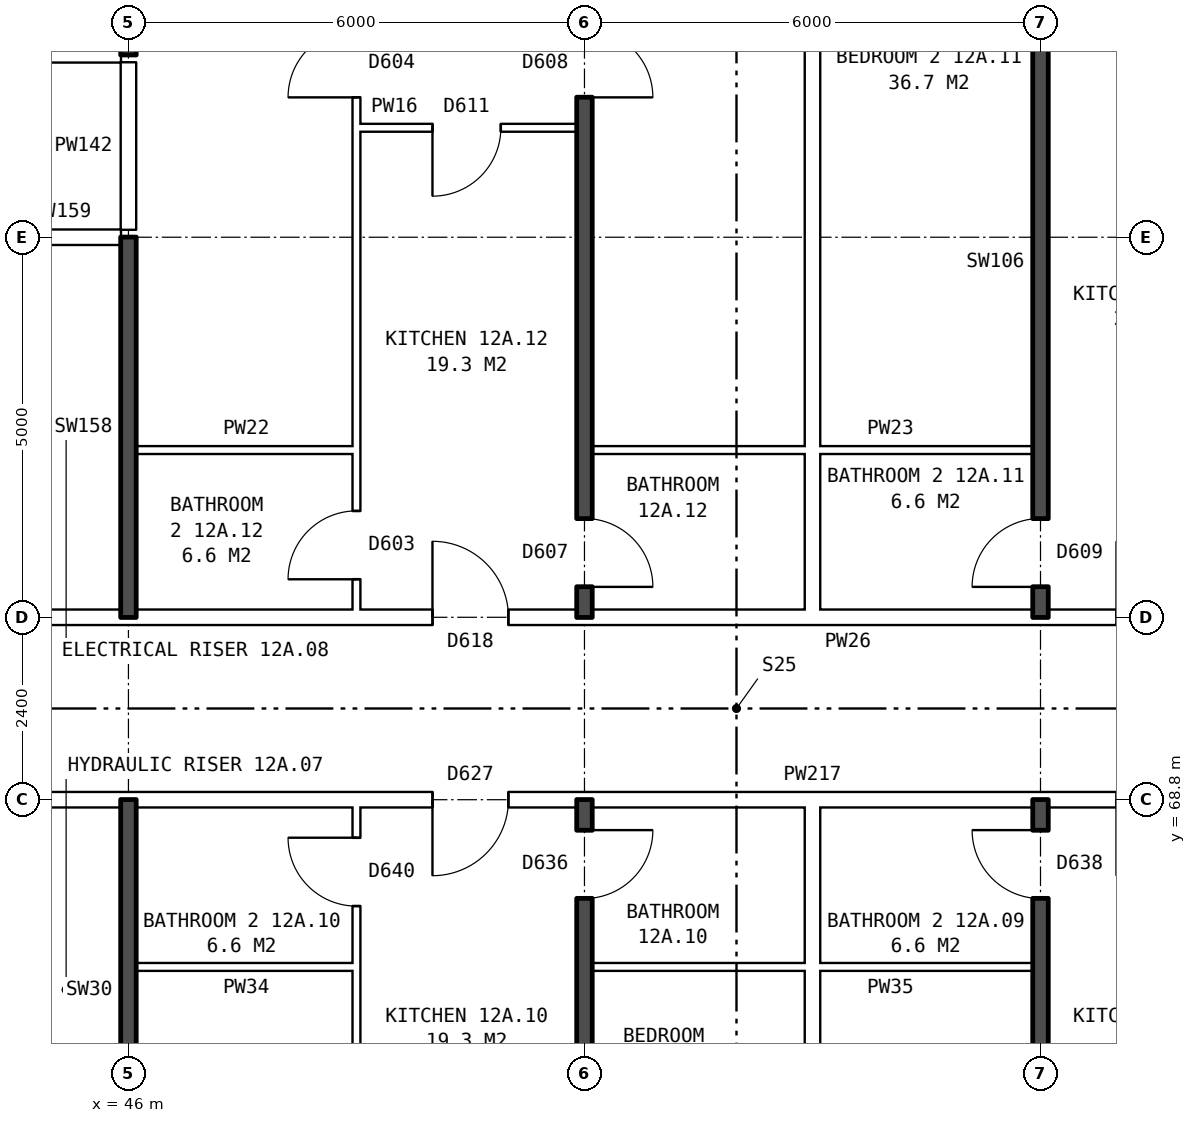
"""IFC4 building model, lengths in metres.
Left out: names, types, materials, properties, quantities, classifications, styles, units other than length and angle.
Written with IfcOpenShell. Run it as: python <this file> out.ifc"""

import sys

from ifc_helpers import new_model, si_unit, direction, frame, frame_2d, origin, place, context, subcontext, project, spatial, rectangle, extrude, element, fill, save


model = new_model("IFC4")
c1 = context("Model", 3, precision=1e-05, world=origin(), true_north=direction((0.0, 1.0)))
c2 = subcontext(c1, "Body", "Model", "MODEL_VIEW")
j1 = project(units=[si_unit("LENGTHUNIT", "METRE"), si_unit("PLANEANGLEUNIT", "RADIAN")], contexts=[c1])
p1 = place(None, origin())
s1 = spatial("IfcSite", under=j1, at=p1, CompositionType="ELEMENT")
p2 = place(p1, origin())
s2 = spatial("IfcBuilding", under=s1, at=p2, CompositionType="ELEMENT")
p3 = place(p2, frame((0.0, 0.0, 47.4)))
s3 = spatial("IfcBuildingStorey", under=s2, at=p3, CompositionType="ELEMENT", Elevation=47.4)
p4 = place(p3, frame((46.1, 66.6, 0.0), z_axis=(0.0, 0.0, 1.0), x_axis=(1.0, 0.0, 0.0)))
e1 = element("IfcWall", 1, at=p4, inside=s3, PredefinedType="PARTITIONING", context=c2, shape_type="SweptSolid", body=[
    extrude(rectangle(XDim=2.9, YDim=0.1, at=frame_2d((1.45, 0.0))), origin(), (0.0, 0.0, 1.0), 2.85),
])
p5 = place(p3, frame((52.1, 66.6, 0.0), z_axis=(0.0, 0.0, 1.0), x_axis=(1.0, 0.0, 0.0)))
e2 = element("IfcWall", 2, at=p5, inside=s3, PredefinedType="PARTITIONING", context=c2, shape_type="SweptSolid", body=[
    extrude(rectangle(XDim=5.8, YDim=0.1, at=frame_2d((2.9, 0.0))), origin(), (0.0, 0.0, 1.0), 2.85),
])
p6 = place(p3, frame((44.36, 68.8, 0.0), z_axis=(0.0, 0.0, 1.0), x_axis=(1.0, 0.0, 0.0)))
e3 = element("IfcWall", 3, at=p6, inside=s3, PredefinedType="PARTITIONING", context=c2, shape_type="SweptSolid", body=[
    extrude(rectangle(XDim=19.28, YDim=0.2, at=frame_2d((9.64, 0.0))), origin(), (0.0, 0.0, 1.0), 2.85),
])
p7 = place(p6, frame((14.64, 0.0, 0.0)))
e4 = element("IfcOpeningElement", 4, at=p7, cuts=e3, PredefinedType="OPENING", context=c2, shape_type="SweptSolid", body=[
    extrude(rectangle(XDim=1.0, YDim=2.1, at=frame_2d((0.5, 1.05))), frame((0.0, 0.11, 0.0), z_axis=(0.0, -1.0, 0.0), x_axis=(1.0, 0.0, 0.0)), (0.0, 0.0, 1.0), 0.22),
])
p8 = place(p6, frame((5.64, 0.0, 0.0)))
e5 = element("IfcOpeningElement", 5, at=p8, cuts=e3, PredefinedType="OPENING", context=c2, shape_type="SweptSolid", body=[
    extrude(rectangle(XDim=1.0, YDim=2.1, at=frame_2d((0.5, 1.05))), frame((0.0, 0.11, 0.0), z_axis=(0.0, -1.0, 0.0), x_axis=(1.0, 0.0, 0.0)), (0.0, 0.0, 1.0), 0.22),
])
p9 = place(p3, frame((44.36, 71.2, 0.0), z_axis=(0.0, 0.0, 1.0), x_axis=(1.0, 0.0, 0.0)))
e6 = element("IfcWall", 6, at=p9, inside=s3, PredefinedType="PARTITIONING", context=c2, shape_type="SweptSolid", body=[
    extrude(rectangle(XDim=19.28, YDim=0.2, at=frame_2d((9.64, 0.0))), origin(), (0.0, 0.0, 1.0), 2.85),
])
p10 = place(p9, frame((14.64, 0.0, 0.0)))
e7 = element("IfcOpeningElement", 7, at=p10, cuts=e6, PredefinedType="OPENING", context=c2, shape_type="SweptSolid", body=[
    extrude(rectangle(XDim=1.0, YDim=2.1, at=frame_2d((0.5, 1.05))), frame((0.0, 0.11, 0.0), z_axis=(0.0, -1.0, 0.0), x_axis=(1.0, 0.0, 0.0)), (0.0, 0.0, 1.0), 0.22),
])
p11 = place(p9, frame((5.64, 0.0, 0.0)))
e8 = element("IfcOpeningElement", 8, at=p11, cuts=e6, PredefinedType="OPENING", context=c2, shape_type="SweptSolid", body=[
    extrude(rectangle(XDim=1.0, YDim=2.1, at=frame_2d((0.5, 1.05))), frame((0.0, 0.11, 0.0), z_axis=(0.0, -1.0, 0.0), x_axis=(1.0, 0.0, 0.0)), (0.0, 0.0, 1.0), 0.22),
])
p12 = place(p3, frame((46.1, 73.4, 0.0), z_axis=(0.0, 0.0, 1.0), x_axis=(1.0, 0.0, 0.0)))
e9 = element("IfcWall", 9, at=p12, inside=s3, PredefinedType="PARTITIONING", context=c2, shape_type="SweptSolid", body=[
    extrude(rectangle(XDim=2.9, YDim=0.1, at=frame_2d((1.45, 0.0))), origin(), (0.0, 0.0, 1.0), 2.85),
])
p13 = place(p3, frame((52.1, 73.4, 0.0), z_axis=(0.0, 0.0, 1.0), x_axis=(1.0, 0.0, 0.0)))
e10 = element("IfcWall", 10, at=p13, inside=s3, PredefinedType="PARTITIONING", context=c2, shape_type="SweptSolid", body=[
    extrude(rectangle(XDim=5.8, YDim=0.1, at=frame_2d((2.9, 0.0))), origin(), (0.0, 0.0, 1.0), 2.85),
])
p14 = place(p3, frame((44.36, 76.2, 0.0), z_axis=(0.0, 0.0, 1.0), x_axis=(1.0, 0.0, 0.0)))
e11 = element("IfcWall", 11, at=p14, inside=s3, PredefinedType="PARTITIONING", context=c2, shape_type="SweptSolid", body=[
    extrude(rectangle(XDim=1.54, YDim=0.2, at=frame_2d((0.77, 0.0))), origin(), (0.0, 0.0, 1.0), 2.85),
])
p15 = place(p3, frame((49.0, 77.64, 0.0), z_axis=(0.0, 0.0, 1.0), x_axis=(1.0, 0.0, 0.0)))
e12 = element("IfcWall", 12, at=p15, inside=s3, PredefinedType="PARTITIONING", context=c2, shape_type="SweptSolid", body=[
    extrude(rectangle(XDim=2.9, YDim=0.1, at=frame_2d((1.45, 0.0))), origin(), (0.0, 0.0, 1.0), 2.85),
])
p16 = place(p15, frame((1.0, 0.0, 0.0)))
e13 = element("IfcOpeningElement", 13, at=p16, cuts=e12, PredefinedType="OPENING", context=c2, shape_type="SweptSolid", body=[
    extrude(rectangle(XDim=0.9, YDim=2.1, at=frame_2d((0.45, 1.05))), frame((0.0, 0.06, 0.0), z_axis=(0.0, -1.0, 0.0), x_axis=(1.0, 0.0, 0.0)), (0.0, 0.0, 1.0), 0.12),
])
p17 = place(p3, frame((21.86, 78.6, 0.0), z_axis=(0.0, 0.0, 1.0), x_axis=(1.0, 0.0, 0.0)))
e14 = element("IfcWall", 14, at=p17, inside=s3, PredefinedType="PARTITIONING", context=c2, shape_type="SweptSolid", body=[
    extrude(rectangle(XDim=24.04, YDim=0.2, at=frame_2d((12.02, 0.0))), origin(), (0.0, 0.0, 1.0), 2.85),
])
p18 = place(p17, frame((20.59, 0.0, 0.0)))
e15 = element("IfcOpeningElement", 15, at=p18, cuts=e14, PredefinedType="OPENING", context=c2, shape_type="SweptSolid", body=[
    extrude(rectangle(XDim=1.0, YDim=2.1, at=frame_2d((0.5, 1.05))), frame((0.0, 0.11, 0.0), z_axis=(0.0, -1.0, 0.0), x_axis=(1.0, 0.0, 0.0)), (0.0, 0.0, 1.0), 0.22),
])
p19 = place(p17, frame((8.64, 0.0, 0.0)))
e16 = element("IfcOpeningElement", 16, at=p19, cuts=e14, PredefinedType="OPENING", context=c2, shape_type="SweptSolid", body=[
    extrude(rectangle(XDim=1.0, YDim=2.1, at=frame_2d((0.5, 1.05))), frame((0.0, 0.11, 0.0), z_axis=(0.0, -1.0, 0.0), x_axis=(1.0, 0.0, 0.0)), (0.0, 0.0, 1.0), 0.22),
])
p20 = place(p17, frame((1.37, 0.0, 0.0)))
e17 = element("IfcOpeningElement", 17, at=p20, cuts=e14, PredefinedType="OPENING", context=c2, shape_type="SweptSolid", body=[
    extrude(rectangle(XDim=1.0, YDim=2.1, at=frame_2d((0.5, 1.05))), frame((0.0, 0.11, 0.0), z_axis=(0.0, -1.0, 0.0), x_axis=(1.0, 0.0, 0.0)), (0.0, 0.0, 1.0), 0.22),
])
for number, where, z_axis, x_axis in (
    (18, (46.0, 63.8, 0.0), (0.0, 0.0, 1.0), (0.0, 1.0, 0.0)),
    (19, (46.0, 71.2, 0.0), (0.0, 0.0, 1.0), (0.0, 1.0, 0.0)),
):
    element("IfcWall", number, at=place(p3, frame(where, z_axis=z_axis, x_axis=x_axis)), inside=s3, PredefinedType="SOLIDWALL", context=c2, shape_type="SweptSolid", body=[
        extrude(rectangle(XDim=5.0, YDim=0.2, at=frame_2d((2.5, 0.0))), origin(), (0.0, 0.0, 1.0), 2.85),
    ])
p21 = place(p3, frame((46.0, 76.3, 0.0), z_axis=(0.0, 0.0, 1.0), x_axis=(0.0, 1.0, 0.0)))
e20 = element("IfcWall", 20, at=p21, inside=s3, PredefinedType="PARTITIONING", context=c2, shape_type="SweptSolid", body=[
    extrude(rectangle(XDim=2.2, YDim=0.2, at=frame_2d((1.1, 0.0))), origin(), (0.0, 0.0, 1.0), 2.85),
])
p22 = place(p3, frame((46.0, 78.6, 0.0), z_axis=(0.0, 0.0, 1.0), x_axis=(0.0, 1.0, 0.0)))
e21 = element("IfcWall", 21, at=p22, inside=s3, PredefinedType="SOLIDWALL", context=c2, shape_type="SweptSolid", body=[
    extrude(rectangle(XDim=7.04, YDim=0.2, at=frame_2d((3.52, 0.0))), origin(), (0.0, 0.0, 1.0), 2.85),
])
p23 = place(p3, frame((49.0, 54.36, 0.0), z_axis=(0.0, 0.0, 1.0), x_axis=(0.0, 1.0, 0.0)))
e22 = element("IfcWall", 22, at=p23, inside=s3, PredefinedType="PARTITIONING", context=c2, shape_type="SweptSolid", body=[
    extrude(rectangle(XDim=14.34, YDim=0.1, at=frame_2d((7.17, 0.0))), origin(), (0.0, 0.0, 1.0), 2.85),
])
p24 = place(p23, frame((6.7, 0.0, 0.0)))
e23 = element("IfcOpeningElement", 23, at=p24, cuts=e22, PredefinedType="OPENING", context=c2, shape_type="SweptSolid", body=[
    extrude(rectangle(XDim=0.9, YDim=2.1, at=frame_2d((0.45, 1.05))), frame((0.0, 0.06, 0.0), z_axis=(0.0, -1.0, 0.0), x_axis=(1.0, 0.0, 0.0)), (0.0, 0.0, 1.0), 0.12),
])
p25 = place(p23, frame((13.04, 0.0, 0.0)))
e24 = element("IfcOpeningElement", 24, at=p25, cuts=e22, PredefinedType="OPENING", context=c2, shape_type="SweptSolid", body=[
    extrude(rectangle(XDim=0.9, YDim=2.1, at=frame_2d((0.45, 1.05))), frame((0.0, 0.06, 0.0), z_axis=(0.0, -1.0, 0.0), x_axis=(1.0, 0.0, 0.0)), (0.0, 0.0, 1.0), 0.12),
])
p26 = place(p3, frame((49.0, 71.3, 0.0), z_axis=(0.0, 0.0, 1.0), x_axis=(0.0, 1.0, 0.0)))
e25 = element("IfcWall", 25, at=p26, inside=s3, PredefinedType="PARTITIONING", context=c2, shape_type="SweptSolid", body=[
    extrude(rectangle(XDim=14.34, YDim=0.1, at=frame_2d((7.17, 0.0))), origin(), (0.0, 0.0, 1.0), 2.85),
])
p27 = place(p26, frame((6.74, 0.0, 0.0)))
e26 = element("IfcOpeningElement", 26, at=p27, cuts=e25, PredefinedType="OPENING", context=c2, shape_type="SweptSolid", body=[
    extrude(rectangle(XDim=0.9, YDim=2.1, at=frame_2d((0.45, 1.05))), frame((0.0, 0.06, 0.0), z_axis=(0.0, -1.0, 0.0), x_axis=(1.0, 0.0, 0.0)), (0.0, 0.0, 1.0), 0.12),
])
p28 = place(p26, frame((0.4, 0.0, 0.0)))
e27 = element("IfcOpeningElement", 27, at=p28, cuts=e25, PredefinedType="OPENING", context=c2, shape_type="SweptSolid", body=[
    extrude(rectangle(XDim=0.9, YDim=2.1, at=frame_2d((0.45, 1.05))), frame((0.0, 0.06, 0.0), z_axis=(0.0, -1.0, 0.0), x_axis=(1.0, 0.0, 0.0)), (0.0, 0.0, 1.0), 0.12),
])
p29 = place(p3, frame((52.0, 54.36, 0.0), z_axis=(0.0, 0.0, 1.0), x_axis=(0.0, 1.0, 0.0)))
e28 = element("IfcWall", 28, at=p29, inside=s3, PredefinedType="SOLIDWALL", context=c2, shape_type="SweptSolid", body=[
    extrude(rectangle(XDim=14.44, YDim=0.2, at=frame_2d((7.22, 0.0))), origin(), (0.0, 0.0, 1.0), 2.85),
])
p30 = place(p29, frame((6.7, 0.0, 0.0)))
e29 = element("IfcOpeningElement", 29, at=p30, cuts=e28, PredefinedType="OPENING", context=c2, shape_type="SweptSolid", body=[
    extrude(rectangle(XDim=0.9, YDim=2.1, at=frame_2d((0.45, 1.05))), frame((0.0, 0.11, 0.0), z_axis=(0.0, -1.0, 0.0), x_axis=(1.0, 0.0, 0.0)), (0.0, 0.0, 1.0), 0.22),
])
p31 = place(p29, frame((13.14, 0.0, 0.0)))
e30 = element("IfcOpeningElement", 30, at=p31, cuts=e28, PredefinedType="OPENING", context=c2, shape_type="SweptSolid", body=[
    extrude(rectangle(XDim=0.9, YDim=2.1, at=frame_2d((0.45, 1.05))), frame((0.0, 0.11, 0.0), z_axis=(0.0, -1.0, 0.0), x_axis=(1.0, 0.0, 0.0)), (0.0, 0.0, 1.0), 0.22),
])
p32 = place(p3, frame((52.0, 71.2, 0.0), z_axis=(0.0, 0.0, 1.0), x_axis=(0.0, 1.0, 0.0)))
e31 = element("IfcWall", 31, at=p32, inside=s3, PredefinedType="SOLIDWALL", context=c2, shape_type="SweptSolid", body=[
    extrude(rectangle(XDim=14.44, YDim=0.2, at=frame_2d((7.22, 0.0))), origin(), (0.0, 0.0, 1.0), 2.85),
])
p33 = place(p32, frame((6.84, 0.0, 0.0)))
e32 = element("IfcOpeningElement", 32, at=p33, cuts=e31, PredefinedType="OPENING", context=c2, shape_type="SweptSolid", body=[
    extrude(rectangle(XDim=0.9, YDim=2.1, at=frame_2d((0.45, 1.05))), frame((0.0, 0.11, 0.0), z_axis=(0.0, -1.0, 0.0), x_axis=(1.0, 0.0, 0.0)), (0.0, 0.0, 1.0), 0.22),
])
p34 = place(p32, frame((0.4, 0.0, 0.0)))
e33 = element("IfcOpeningElement", 33, at=p34, cuts=e31, PredefinedType="OPENING", context=c2, shape_type="SweptSolid", body=[
    extrude(rectangle(XDim=0.9, YDim=2.1, at=frame_2d((0.45, 1.05))), frame((0.0, 0.11, 0.0), z_axis=(0.0, -1.0, 0.0), x_axis=(1.0, 0.0, 0.0)), (0.0, 0.0, 1.0), 0.22),
])
for number, where, z_axis, x_axis in (
    (34, (55.0, 54.36, 0.0), (0.0, 0.0, 1.0), (0.0, 1.0, 0.0)),
    (35, (55.0, 71.3, 0.0), (0.0, 0.0, 1.0), (0.0, 1.0, 0.0)),
):
    element("IfcWall", number, at=place(p3, frame(where, z_axis=z_axis, x_axis=x_axis)), inside=s3, PredefinedType="PARTITIONING", context=c2, shape_type="SweptSolid", body=[
        extrude(rectangle(XDim=14.34, YDim=0.2, at=frame_2d((7.17, 0.0))), origin(), (0.0, 0.0, 1.0), 2.85),
    ])
p35 = place(p3, frame((58.0, 54.36, 0.0), z_axis=(0.0, 0.0, 1.0), x_axis=(0.0, 1.0, 0.0)))
e36 = element("IfcWall", 36, at=p35, inside=s3, PredefinedType="SOLIDWALL", context=c2, shape_type="SweptSolid", body=[
    extrude(rectangle(XDim=14.44, YDim=0.2, at=frame_2d((7.22, 0.0))), origin(), (0.0, 0.0, 1.0), 2.85),
])
p36 = place(p35, frame((6.7, 0.0, 0.0)))
e37 = element("IfcOpeningElement", 37, at=p36, cuts=e36, PredefinedType="OPENING", context=c2, shape_type="SweptSolid", body=[
    extrude(rectangle(XDim=0.9, YDim=2.1, at=frame_2d((0.45, 1.05))), frame((0.0, 0.11, 0.0), z_axis=(0.0, -1.0, 0.0), x_axis=(1.0, 0.0, 0.0)), (0.0, 0.0, 1.0), 0.22),
])
p37 = place(p35, frame((13.14, 0.0, 0.0)))
e38 = element("IfcOpeningElement", 38, at=p37, cuts=e36, PredefinedType="OPENING", context=c2, shape_type="SweptSolid", body=[
    extrude(rectangle(XDim=0.9, YDim=2.1, at=frame_2d((0.45, 1.05))), frame((0.0, 0.11, 0.0), z_axis=(0.0, -1.0, 0.0), x_axis=(1.0, 0.0, 0.0)), (0.0, 0.0, 1.0), 0.22),
])
p38 = place(p3, frame((58.0, 71.2, 0.0), z_axis=(0.0, 0.0, 1.0), x_axis=(0.0, 1.0, 0.0)))
e39 = element("IfcWall", 39, at=p38, inside=s3, PredefinedType="SOLIDWALL", context=c2, shape_type="SweptSolid", body=[
    extrude(rectangle(XDim=14.44, YDim=0.2, at=frame_2d((7.22, 0.0))), origin(), (0.0, 0.0, 1.0), 2.85),
])
p39 = place(p38, frame((8.04, 0.0, 0.0)))
e40 = element("IfcOpeningElement", 40, at=p39, cuts=e39, PredefinedType="OPENING", context=c2, shape_type="SweptSolid", body=[
    extrude(rectangle(XDim=0.9, YDim=2.1, at=frame_2d((0.45, 1.05))), frame((0.0, 0.11, 0.0), z_axis=(0.0, -1.0, 0.0), x_axis=(1.0, 0.0, 0.0)), (0.0, 0.0, 1.0), 0.22),
])
p40 = place(p38, frame((0.4, 0.0, 0.0)))
e41 = element("IfcOpeningElement", 41, at=p40, cuts=e39, PredefinedType="OPENING", context=c2, shape_type="SweptSolid", body=[
    extrude(rectangle(XDim=0.9, YDim=2.1, at=frame_2d((0.45, 1.05))), frame((0.0, 0.11, 0.0), z_axis=(0.0, -1.0, 0.0), x_axis=(1.0, 0.0, 0.0)), (0.0, 0.0, 1.0), 0.22),
])
p41 = place(p37, origin())
e42 = element("IfcDoor", 42, at=p41, inside=s3, OperationType="SINGLE_SWING_RIGHT", PredefinedType="DOOR", context=c2, shape_type="SweptSolid", body=[
    extrude(rectangle(XDim=0.9, YDim=2.1, at=frame_2d((0.45, 1.05))), frame((0.0, 0.025, 0.0), z_axis=(0.0, -1.0, 0.0), x_axis=(1.0, 0.0, 0.0)), (0.0, 0.0, 1.0), 0.05),
])
fill(e38, e42)
p42 = place(p8, frame((1.0, 0.0, 0.0), z_axis=(0.0, 0.0, 1.0), x_axis=(-1.0, 0.0, 0.0)))
e43 = element("IfcDoor", 43, at=p42, inside=s3, OperationType="SINGLE_SWING_RIGHT", PredefinedType="DOOR", context=c2, shape_type="SweptSolid", body=[
    extrude(rectangle(XDim=1.0, YDim=2.1, at=frame_2d((0.5, 1.05))), frame((0.0, 0.025, 0.0), z_axis=(0.0, -1.0, 0.0), x_axis=(1.0, 0.0, 0.0)), (0.0, 0.0, 1.0), 0.05),
])
fill(e5, e43)
p43 = place(p31, frame((0.9, 0.0, 0.0), z_axis=(0.0, 0.0, 1.0), x_axis=(-1.0, 0.0, 0.0)))
e44 = element("IfcDoor", 44, at=p43, inside=s3, OperationType="SINGLE_SWING_LEFT", PredefinedType="DOOR", context=c2, shape_type="SweptSolid", body=[
    extrude(rectangle(XDim=0.9, YDim=2.1, at=frame_2d((0.45, 1.05))), frame((0.0, 0.025, 0.0), z_axis=(0.0, -1.0, 0.0), x_axis=(1.0, 0.0, 0.0)), (0.0, 0.0, 1.0), 0.05),
])
fill(e30, e44)
p44 = place(p25, origin())
e45 = element("IfcDoor", 45, at=p44, inside=s3, OperationType="SINGLE_SWING_RIGHT", PredefinedType="DOOR", context=c2, shape_type="SweptSolid", body=[
    extrude(rectangle(XDim=0.9, YDim=2.1, at=frame_2d((0.45, 1.05))), frame((0.0, 0.025, 0.0), z_axis=(0.0, -1.0, 0.0), x_axis=(1.0, 0.0, 0.0)), (0.0, 0.0, 1.0), 0.05),
])
fill(e24, e45)
p45 = place(p40, origin())
e46 = element("IfcDoor", 46, at=p45, inside=s3, OperationType="SINGLE_SWING_LEFT", PredefinedType="DOOR", context=c2, shape_type="SweptSolid", body=[
    extrude(rectangle(XDim=0.9, YDim=2.1, at=frame_2d((0.45, 1.05))), frame((0.0, 0.025, 0.0), z_axis=(0.0, -1.0, 0.0), x_axis=(1.0, 0.0, 0.0)), (0.0, 0.0, 1.0), 0.05),
])
fill(e41, e46)
p46 = place(p33, frame((0.9, 0.0, 0.0), z_axis=(0.0, 0.0, 1.0), x_axis=(-1.0, 0.0, 0.0)))
e47 = element("IfcDoor", 47, at=p46, inside=s3, OperationType="SINGLE_SWING_RIGHT", PredefinedType="DOOR", context=c2, shape_type="SweptSolid", body=[
    extrude(rectangle(XDim=0.9, YDim=2.1, at=frame_2d((0.45, 1.05))), frame((0.0, 0.025, 0.0), z_axis=(0.0, -1.0, 0.0), x_axis=(1.0, 0.0, 0.0)), (0.0, 0.0, 1.0), 0.05),
])
fill(e32, e47)
p47 = place(p27, origin())
e48 = element("IfcDoor", 48, at=p47, inside=s3, OperationType="SINGLE_SWING_LEFT", PredefinedType="DOOR", context=c2, shape_type="SweptSolid", body=[
    extrude(rectangle(XDim=0.9, YDim=2.1, at=frame_2d((0.45, 1.05))), frame((0.0, 0.025, 0.0), z_axis=(0.0, -1.0, 0.0), x_axis=(1.0, 0.0, 0.0)), (0.0, 0.0, 1.0), 0.05),
])
fill(e26, e48)
p48 = place(p11, origin())
e49 = element("IfcDoor", 49, at=p48, inside=s3, OperationType="SINGLE_SWING_LEFT", PredefinedType="DOOR", context=c2, shape_type="SweptSolid", body=[
    extrude(rectangle(XDim=1.0, YDim=2.1, at=frame_2d((0.5, 1.05))), frame((0.0, 0.025, 0.0), z_axis=(0.0, -1.0, 0.0), x_axis=(1.0, 0.0, 0.0)), (0.0, 0.0, 1.0), 0.05),
])
fill(e8, e49)
p49 = place(p16, frame((0.9, 0.0, 0.0), z_axis=(0.0, 0.0, 1.0), x_axis=(-1.0, 0.0, 0.0)))
e50 = element("IfcDoor", 50, at=p49, inside=s3, OperationType="SINGLE_SWING_RIGHT", PredefinedType="DOOR", context=c2, shape_type="SweptSolid", body=[
    extrude(rectangle(XDim=0.9, YDim=2.1, at=frame_2d((0.45, 1.05))), frame((0.0, 0.025, 0.0), z_axis=(0.0, -1.0, 0.0), x_axis=(1.0, 0.0, 0.0)), (0.0, 0.0, 1.0), 0.05),
])
fill(e13, e50)
p50 = place(p34, frame((0.9, 0.0, 0.0), z_axis=(0.0, 0.0, 1.0), x_axis=(-1.0, 0.0, 0.0)))
e51 = element("IfcDoor", 51, at=p50, inside=s3, OperationType="SINGLE_SWING_RIGHT", PredefinedType="DOOR", context=c2, shape_type="SweptSolid", body=[
    extrude(rectangle(XDim=0.9, YDim=2.1, at=frame_2d((0.45, 1.05))), frame((0.0, 0.025, 0.0), z_axis=(0.0, -1.0, 0.0), x_axis=(1.0, 0.0, 0.0)), (0.0, 0.0, 1.0), 0.05),
])
fill(e33, e51)
p51 = place(p28, origin())
e52 = element("IfcDoor", 52, at=p51, inside=s3, OperationType="SINGLE_SWING_LEFT", PredefinedType="DOOR", context=c2, shape_type="SweptSolid", body=[
    extrude(rectangle(XDim=0.9, YDim=2.1, at=frame_2d((0.45, 1.05))), frame((0.0, 0.025, 0.0), z_axis=(0.0, -1.0, 0.0), x_axis=(1.0, 0.0, 0.0)), (0.0, 0.0, 1.0), 0.05),
])
fill(e27, e52)
save(model, sys.argv[1])
